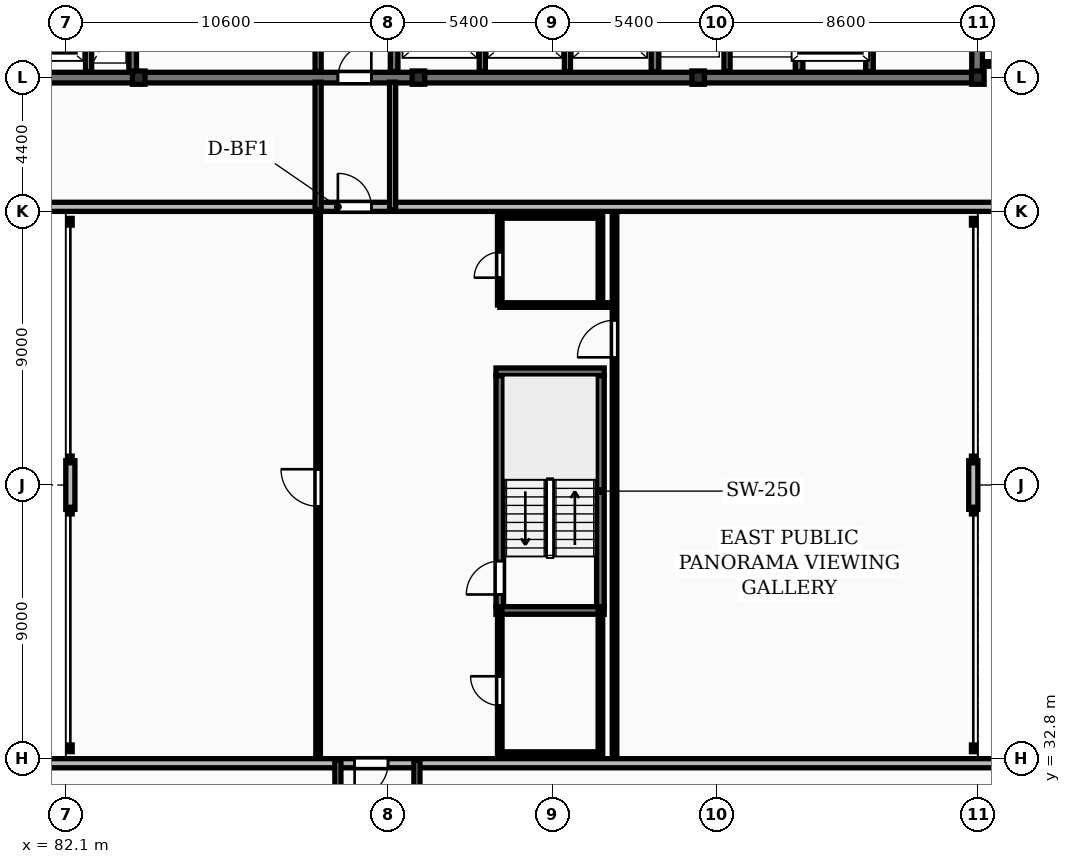
"""IFC4 building model, lengths in metres.
Left out: names, types, materials, properties, quantities, classifications, styles, units other than length and angle.
Written with IfcOpenShell. Run it as: python <this file> out.ifc"""

import sys

from ifc_helpers import new_model, si_unit, direction, frame, frame_2d, origin, origin_2d, place, context, subcontext, project, spatial, rectangle, i_section, extrude, element, fill, save


model = new_model("IFC4")
c1 = context("Model", 3, precision=1e-05, world=origin(), true_north=direction((0.0, 1.0)))
c2 = subcontext(c1, "Body", "Model", "MODEL_VIEW")
j1 = project(units=[si_unit("LENGTHUNIT", "METRE"), si_unit("PLANEANGLEUNIT", "RADIAN")], contexts=[c1])
p1 = place(None, origin())
s1 = spatial("IfcSite", under=j1, at=p1, CompositionType="ELEMENT")
p2 = place(p1, origin())
s2 = spatial("IfcBuilding", under=s1, at=p2, CompositionType="ELEMENT")
p3 = place(p2, frame((0.0, 0.0, 150.1)))
s3 = spatial("IfcBuildingStorey", under=s2, at=p3, CompositionType="ELEMENT", Elevation=150.1)
for number, where, z_axis, x_axis in (
    (1, (84.5, 55.2, 0.0), (0.0, 0.0, 1.0), (1.0, 0.0, 0.0)),
    (2, (93.7, 55.2, 0.0), (0.0, 0.0, 1.0), (1.0, 0.0, 0.0)),
    (3, (102.9, 55.2, 0.0), (0.0, 0.0, 1.0), (1.0, 0.0, 0.0)),
    (4, (112.1, 55.2, 0.0), (0.0, 0.0, 1.0), (1.0, 0.0, 0.0)),
):
    element("IfcColumn", number, at=place(p3, frame(where, z_axis=z_axis, x_axis=x_axis)), inside=s3, PredefinedType="COLUMN", context=c2, shape_type="SweptSolid", body=[
        extrude(i_section(OverallWidth=0.412, OverallDepth=0.437, WebThickness=0.036, FlangeThickness=0.052, FilletRadius=0.015, at=origin_2d()), origin(), (0.0, 0.0, 1.0), 3.6),
    ])
p4 = place(p3, frame((57.6, 50.95, 0.0), z_axis=(0.0, 0.0, 1.0), x_axis=(1.0, 0.0, 0.0)))
e5 = element("IfcWall", 5, at=p4, inside=s3, PredefinedType="STANDARD", context=c2, shape_type="SweptSolid", body=[
    extrude(rectangle(XDim=73.0, YDim=0.3, at=frame_2d((36.5, 0.0))), origin(), (0.0, 0.0, 1.0), 3.31),
])
p5 = place(p4, frame((15.225, 0.0, 0.85)))
e6 = element("IfcOpeningElement", 6, at=p5, cuts=e5, PredefinedType="OPENING", context=c2, shape_type="SweptSolid", body=[
    extrude(rectangle(XDim=1.8, YDim=1.8, at=frame_2d((0.9, 0.9))), frame((0.0, 0.16, 0.0), z_axis=(0.0, -1.0, 0.0), x_axis=(1.0, 0.0, 0.0)), (0.0, 0.0, 1.0), 0.32),
])
p6 = place(p4, frame((58.575, 0.0, 0.85)))
e7 = element("IfcOpeningElement", 7, at=p6, cuts=e5, PredefinedType="OPENING", context=c2, shape_type="SweptSolid", body=[
    extrude(rectangle(XDim=1.8, YDim=1.8, at=frame_2d((0.9, 0.9))), frame((0.0, 0.16, 0.0), z_axis=(0.0, -1.0, 0.0), x_axis=(1.0, 0.0, 0.0)), (0.0, 0.0, 1.0), 0.32),
])
p7 = place(p4, frame((33.45, 0.0, 0.0)))
e8 = element("IfcOpeningElement", 8, at=p7, cuts=e5, PredefinedType="OPENING", context=c2, shape_type="SweptSolid", body=[
    extrude(rectangle(XDim=1.1, YDim=2.1, at=frame_2d((0.55, 1.05))), frame((0.0, 0.16, 0.0), z_axis=(0.0, -1.0, 0.0), x_axis=(1.0, 0.0, 0.0)), (0.0, 0.0, 1.0), 0.32),
])
p8 = place(p3, frame((130.7, 32.65, 0.0), z_axis=(0.0, 0.0, 1.0), x_axis=(-1.0, 0.0, 0.0)))
e9 = element("IfcWall", 9, at=p8, inside=s3, PredefinedType="STANDARD", context=c2, shape_type="SweptSolid", body=[
    extrude(rectangle(XDim=58.0, YDim=0.3, at=frame_2d((29.0, 0.0))), origin(), (0.0, 0.0, 1.0), 3.31),
])
p9 = place(p8, frame((50.125, 0.0, 0.85)))
e10 = element("IfcOpeningElement", 10, at=p9, cuts=e9, PredefinedType="OPENING", context=c2, shape_type="SweptSolid", body=[
    extrude(rectangle(XDim=1.8, YDim=1.8, at=frame_2d((0.9, 0.9))), frame((0.0, 0.16, 0.0), z_axis=(0.0, -1.0, 0.0), x_axis=(1.0, 0.0, 0.0)), (0.0, 0.0, 1.0), 0.32),
])
p10 = place(p8, frame((6.775, 0.0, 0.85)))
e11 = element("IfcOpeningElement", 11, at=p10, cuts=e9, PredefinedType="OPENING", context=c2, shape_type="SweptSolid", body=[
    extrude(rectangle(XDim=1.8, YDim=1.8, at=frame_2d((0.9, 0.9))), frame((0.0, 0.16, 0.0), z_axis=(0.0, -1.0, 0.0), x_axis=(1.0, 0.0, 0.0)), (0.0, 0.0, 1.0), 0.32),
])
p11 = place(p8, frame((38.0, 0.0, 0.0)))
e12 = element("IfcOpeningElement", 12, at=p11, cuts=e9, PredefinedType="OPENING", context=c2, shape_type="SweptSolid", body=[
    extrude(rectangle(XDim=1.1, YDim=2.1, at=frame_2d((0.55, 1.05))), frame((0.0, 0.16, 0.0), z_axis=(0.0, -1.0, 0.0), x_axis=(1.0, 0.0, 0.0)), (0.0, 0.0, 1.0), 0.32),
])
for number, where, z_axis, x_axis in (
    (13, (82.25, 41.0, 0.0), (0.0, 0.0, 1.0), (0.0, 1.0, 0.0)),
    (14, (111.95, 41.0, 0.0), (0.0, 0.0, 1.0), (0.0, 1.0, 0.0)),
):
    element("IfcWall", number, at=place(p3, frame(where, z_axis=z_axis, x_axis=x_axis)), inside=s3, PredefinedType="STANDARD", context=c2, shape_type="SweptSolid", body=[
        extrude(rectangle(XDim=1.6, YDim=0.3, at=frame_2d((0.8, 0.0))), origin(), (0.0, 0.0, 1.0), 2.38),
    ])
p12 = place(p3, frame((75.95, 55.2, 0.0), z_axis=(0.0, 0.0, 1.0), x_axis=(1.0, 0.0, 0.0)))
e15 = element("IfcWall", 15, at=p12, inside=s3, PredefinedType="SHEAR", context=c2, shape_type="SweptSolid", body=[
    extrude(rectangle(XDim=36.3, YDim=0.35, at=frame_2d((18.15, 0.0))), origin(), (0.0, 0.0, 1.0), 3.6),
])
p13 = place(p12, frame((15.1, 0.0, 0.0)))
e16 = element("IfcOpeningElement", 16, at=p13, cuts=e15, PredefinedType="OPENING", context=c2, shape_type="SweptSolid", body=[
    extrude(rectangle(XDim=1.1, YDim=2.1, at=frame_2d((0.55, 1.05))), frame((0.0, 0.185, 0.0), z_axis=(0.0, -1.0, 0.0), x_axis=(1.0, 0.0, 0.0)), (0.0, 0.0, 1.0), 0.37),
])
p14 = place(p3, frame((112.075, 55.375, 0.0), z_axis=(0.0, 0.0, 1.0), x_axis=(0.0, 1.0, 0.0)))
e17 = element("IfcWall", 17, at=p14, inside=s3, PredefinedType="SHEAR", context=c2, shape_type="SweptSolid", body=[
    extrude(rectangle(XDim=11.65, YDim=0.35, at=frame_2d((5.825, 0.0))), origin(), (0.0, 0.0, 1.0), 3.6),
])
p15 = place(p3, frame((82.85, 55.4, 0.0), z_axis=(0.0, 0.0, 1.0), x_axis=(0.0, 1.0, 0.0)))
e18 = element("IfcWall", 18, at=p15, inside=s3, PredefinedType="PARTITIONING", context=c2, shape_type="SweptSolid", body=[
    extrude(rectangle(XDim=2.56, YDim=0.2, at=frame_2d((1.28, 0.0))), origin(), (0.0, 0.0, 1.0), 3.31),
])
p16 = place(p3, frame((84.3, 55.4, 0.0), z_axis=(0.0, 0.0, 1.0), x_axis=(0.0, 1.0, 0.0)))
e19 = element("IfcWall", 19, at=p16, inside=s3, PredefinedType="SHEAR", context=c2, shape_type="SweptSolid", body=[
    extrude(rectangle(XDim=11.6, YDim=0.25, at=frame_2d((5.8, 0.0))), origin(), (0.0, 0.0, 1.0), 3.6),
])
p17 = place(p16, frame((5.2, 0.0, 0.0)))
e20 = element("IfcOpeningElement", 20, at=p17, cuts=e19, PredefinedType="OPENING", context=c2, shape_type="SweptSolid", body=[
    extrude(rectangle(XDim=1.1, YDim=2.1, at=frame_2d((0.55, 1.05))), frame((0.0, 0.135, 0.0), z_axis=(0.0, -1.0, 0.0), x_axis=(1.0, 0.0, 0.0)), (0.0, 0.0, 1.0), 0.27),
])
p18 = place(p3, frame((90.4, 55.4, 0.0), z_axis=(0.0, 0.0, 1.0), x_axis=(0.0, 1.0, 0.0)))
e21 = element("IfcWall", 21, at=p18, inside=s3, PredefinedType="PARTITIONING", context=c2, shape_type="SweptSolid", body=[
    extrude(rectangle(XDim=4.1, YDim=0.2, at=frame_2d((2.05, 0.0))), origin(), (0.0, 0.0, 1.0), 3.31),
])
p19 = place(p3, frame((92.9, 55.4, 0.0), z_axis=(0.0, 0.0, 1.0), x_axis=(0.0, 1.0, 0.0)))
e22 = element("IfcWall", 22, at=p19, inside=s3, PredefinedType="SHEAR", context=c2, shape_type="SweptSolid", body=[
    extrude(rectangle(XDim=4.1, YDim=0.25, at=frame_2d((2.05, 0.0))), origin(), (0.0, 0.0, 1.0), 3.6),
])
for number, where, z_axis, x_axis in (
    (23, (95.8, 55.4, 0.0), (0.0, 0.0, 1.0), (0.0, 1.0, 0.0)),
    (24, (98.6, 55.4, 0.0), (0.0, 0.0, 1.0), (0.0, 1.0, 0.0)),
):
    element("IfcWall", number, at=place(p3, frame(where, z_axis=z_axis, x_axis=x_axis)), inside=s3, PredefinedType="PARTITIONING", context=c2, shape_type="SweptSolid", body=[
        extrude(rectangle(XDim=2.72, YDim=0.2, at=frame_2d((1.36, 0.0))), origin(), (0.0, 0.0, 1.0), 3.31),
    ])
p20 = place(p3, frame((101.48, 55.4, 0.0), z_axis=(0.0, 0.0, 1.0), x_axis=(0.0, 1.0, 0.0)))
e25 = element("IfcWall", 25, at=p20, inside=s3, PredefinedType="SHEAR", context=c2, shape_type="SweptSolid", body=[
    extrude(rectangle(XDim=2.85, YDim=0.25, at=frame_2d((1.425, 0.0))), origin(), (0.0, 0.0, 1.0), 3.6),
])
p21 = place(p3, frame((103.85, 55.4, 0.0), z_axis=(0.0, 0.0, 1.0), x_axis=(0.0, 1.0, 0.0)))
e26 = element("IfcWall", 26, at=p21, inside=s3, PredefinedType="PARTITIONING", context=c2, shape_type="SweptSolid", body=[
    extrude(rectangle(XDim=2.72, YDim=0.2, at=frame_2d((1.36, 0.0))), origin(), (0.0, 0.0, 1.0), 3.31),
])
p22 = place(p3, frame((106.22, 55.4, 0.0), z_axis=(0.0, 0.0, 1.0), x_axis=(0.0, 1.0, 0.0)))
e27 = element("IfcWall", 27, at=p22, inside=s3, PredefinedType="SHEAR", context=c2, shape_type="SweptSolid", body=[
    extrude(rectangle(XDim=2.85, YDim=0.25, at=frame_2d((1.425, 0.0))), origin(), (0.0, 0.0, 1.0), 3.6),
])
p23 = place(p3, frame((108.535, 55.4, 0.0), z_axis=(0.0, 0.0, 1.0), x_axis=(0.0, 1.0, 0.0)))
e28 = element("IfcWall", 28, at=p23, inside=s3, PredefinedType="SHEAR", context=c2, shape_type="SweptSolid", body=[
    extrude(rectangle(XDim=11.6, YDim=0.25, at=frame_2d((5.8, 0.0))), origin(), (0.0, 0.0, 1.0), 3.6),
])
p24 = place(p23, frame((8.2, 0.0, 0.0)))
e29 = element("IfcOpeningElement", 29, at=p24, cuts=e28, PredefinedType="OPENING", context=c2, shape_type="SweptSolid", body=[
    extrude(rectangle(XDim=1.1, YDim=2.1, at=frame_2d((0.55, 1.05))), frame((0.0, 0.135, 0.0), z_axis=(0.0, -1.0, 0.0), x_axis=(1.0, 0.0, 0.0)), (0.0, 0.0, 1.0), 0.27),
])
p25 = place(p23, frame((10.25, 0.0, 0.0)))
e30 = element("IfcOpeningElement", 30, at=p25, cuts=e28, PredefinedType="OPENING", context=c2, shape_type="SweptSolid", body=[
    extrude(rectangle(XDim=0.85, YDim=2.05, at=frame_2d((0.425, 1.025))), frame((0.0, 0.135, 0.0), z_axis=(0.0, -1.0, 0.0), x_axis=(1.0, 0.0, 0.0)), (0.0, 0.0, 1.0), 0.27),
])
p26 = place(p3, frame((112.27, 55.65, 0.0), z_axis=(0.0, 0.0, 1.0), x_axis=(1.0, 0.0, 0.0)))
e31 = element("IfcWall", 31, at=p26, inside=s3, PredefinedType="PARTITIONING", context=c2, shape_type="SweptSolid", body=[
    extrude(rectangle(XDim=6.76, YDim=0.15, at=frame_2d((3.38, 0.0))), origin(), (0.0, 0.0, 1.0), 3.31),
])
p27 = place(p26, frame((1.64, 0.0, 0.0)))
e32 = element("IfcOpeningElement", 32, at=p27, cuts=e31, PredefinedType="OPENING", context=c2, shape_type="SweptSolid", body=[
    extrude(rectangle(XDim=0.84, YDim=2.04, at=frame_2d((0.42, 1.02))), frame((0.0, 0.085, 0.0), z_axis=(0.0, -1.0, 0.0), x_axis=(1.0, 0.0, 0.0)), (0.0, 0.0, 1.0), 0.17),
])
p28 = place(p26, frame((3.16, 0.0, 0.0)))
e33 = element("IfcOpeningElement", 33, at=p28, cuts=e31, PredefinedType="OPENING", context=c2, shape_type="SweptSolid", body=[
    extrude(rectangle(XDim=0.88, YDim=2.06, at=frame_2d((0.44, 1.03))), frame((0.0, 0.085, 0.0), z_axis=(0.0, -1.0, 0.0), x_axis=(1.0, 0.0, 0.0)), (0.0, 0.0, 1.0), 0.17),
])
for number, where, z_axis, x_axis in (
    (34, (90.4, 50.85, 0.0), (0.0, 0.0, 1.0), (0.0, 1.0, 0.0)),
    (35, (92.85, 50.85, 0.0), (0.0, 0.0, 1.0), (0.0, 1.0, 0.0)),
):
    element("IfcWall", number, at=place(p3, frame(where, z_axis=z_axis, x_axis=x_axis)), inside=s3, PredefinedType="PARTITIONING", context=c2, shape_type="SweptSolid", body=[
        extrude(rectangle(XDim=4.2, YDim=0.2, at=frame_2d((2.1, 0.0))), origin(), (0.0, 0.0, 1.0), 3.31),
    ])
p29 = place(p3, frame((91.05, 30.55, 0.0), z_axis=(0.0, 0.0, 1.0), x_axis=(0.0, 1.0, 0.0)))
e36 = element("IfcWall", 36, at=p29, inside=s3, PredefinedType="PARTITIONING", context=c2, shape_type="SweptSolid", body=[
    extrude(rectangle(XDim=2.2, YDim=0.2, at=frame_2d((1.1, 0.0))), origin(), (0.0, 0.0, 1.0), 3.31),
])
p30 = place(p3, frame((93.65, 30.55, 0.0), z_axis=(0.0, 0.0, 1.0), x_axis=(0.0, 1.0, 0.0)))
e37 = element("IfcWall", 37, at=p30, inside=s3, PredefinedType="PARTITIONING", context=c2, shape_type="SweptSolid", body=[
    extrude(rectangle(XDim=2.2, YDim=0.2, at=frame_2d((1.1, 0.0))), origin(), (0.0, 0.0, 1.0), 2.389),
])
p31 = place(p3, frame((96.375, 37.8, 0.0), z_axis=(0.0, 0.0, 1.0), x_axis=(0.0, 1.0, 0.0)))
e38 = element("IfcWall", 38, at=p31, inside=s3, PredefinedType="SHEAR", context=c2, shape_type="SweptSolid", body=[
    extrude(rectangle(XDim=7.6, YDim=0.25, at=frame_2d((3.8, 0.0))), origin(), (0.0, 0.0, 1.0), 3.6),
])
p32 = place(p31, frame((0.4, 0.0, 0.0)))
e39 = element("IfcOpeningElement", 39, at=p32, cuts=e38, PredefinedType="OPENING", context=c2, shape_type="SweptSolid", body=[
    extrude(rectangle(XDim=1.1, YDim=2.1, at=frame_2d((0.55, 1.05))), frame((0.0, 0.135, 0.0), z_axis=(0.0, -1.0, 0.0), x_axis=(1.0, 0.0, 0.0)), (0.0, 0.0, 1.0), 0.27),
])
p33 = place(p3, frame((99.685, 37.8, 0.0), z_axis=(0.0, 0.0, 1.0), x_axis=(0.0, 1.0, 0.0)))
e40 = element("IfcWall", 40, at=p33, inside=s3, PredefinedType="SHEAR", context=c2, shape_type="SweptSolid", body=[
    extrude(rectangle(XDim=7.6, YDim=0.25, at=frame_2d((3.8, 0.0))), origin(), (0.0, 0.0, 1.0), 3.6),
])
for number, where, z_axis, x_axis in (
    (41, (96.25, 37.675, 0.0), (0.0, 0.0, 1.0), (1.0, 0.0, 0.0)),
    (42, (96.25, 45.525, 0.0), (0.0, 0.0, 1.0), (1.0, 0.0, 0.0)),
):
    element("IfcWall", number, at=place(p3, frame(where, z_axis=z_axis, x_axis=x_axis)), inside=s3, PredefinedType="SHEAR", context=c2, shape_type="SweptSolid", body=[
        extrude(rectangle(XDim=3.56, YDim=0.25, at=frame_2d((1.78, 0.0))), origin(), (0.0, 0.0, 1.0), 3.6),
    ])
for number, where, z_axis, x_axis in (
    (43, (96.375, 32.95, 0.0), (0.0, 0.0, 1.0), (1.0, 0.0, 0.0)),
    (44, (96.375, 50.65, 0.0), (0.0, 0.0, 1.0), (1.0, 0.0, 0.0)),
):
    element("IfcWall", number, at=place(p3, frame(where, z_axis=z_axis, x_axis=x_axis)), inside=s3, PredefinedType="PARTITIONING", context=c2, shape_type="SweptSolid", body=[
        extrude(rectangle(XDim=3.31, YDim=0.15, at=frame_2d((1.655, 0.0))), origin(), (0.0, 0.0, 1.0), 2.69),
    ])
p34 = place(p3, frame((96.375, 32.95, 0.0), z_axis=(0.0, 0.0, 1.0), x_axis=(0.0, 1.0, 0.0)))
e45 = element("IfcWall", 45, at=p34, inside=s3, PredefinedType="PARTITIONING", context=c2, shape_type="SweptSolid", body=[
    extrude(rectangle(XDim=4.725, YDim=0.15, at=frame_2d((2.363, 0.0))), origin(), (0.0, 0.0, 1.0), 2.389),
])
p35 = place(p34, frame((1.6, 0.0, 0.0)))
e46 = element("IfcOpeningElement", 46, at=p35, cuts=e45, PredefinedType="OPENING", context=c2, shape_type="SweptSolid", body=[
    extrude(rectangle(XDim=0.96, YDim=2.1, at=frame_2d((0.48, 1.05))), frame((0.0, 0.085, 0.0), z_axis=(0.0, -1.0, 0.0), x_axis=(1.0, 0.0, 0.0)), (0.0, 0.0, 1.0), 0.17),
])
p36 = place(p3, frame((96.375, 47.72, 0.0), z_axis=(0.0, 0.0, 1.0), x_axis=(0.0, 1.0, 0.0)))
e47 = element("IfcWall", 47, at=p36, inside=s3, PredefinedType="PARTITIONING", context=c2, shape_type="SweptSolid", body=[
    extrude(rectangle(XDim=2.93, YDim=0.15, at=frame_2d((1.465, 0.0))), origin(), (0.0, 0.0, 1.0), 2.389),
])
p37 = place(p36, frame((0.9, 0.0, 0.0)))
e48 = element("IfcOpeningElement", 48, at=p37, cuts=e47, PredefinedType="OPENING", context=c2, shape_type="SweptSolid", body=[
    extrude(rectangle(XDim=0.84, YDim=2.04, at=frame_2d((0.42, 1.02))), frame((0.0, 0.085, 0.0), z_axis=(0.0, -1.0, 0.0), x_axis=(1.0, 0.0, 0.0)), (0.0, 0.0, 1.0), 0.17),
])
p38 = place(p3, frame((96.375, 47.72, 0.0), z_axis=(0.0, 0.0, 1.0), x_axis=(1.0, 0.0, 0.0)))
e49 = element("IfcWall", 49, at=p38, inside=s3, PredefinedType="PARTITIONING", context=c2, shape_type="SweptSolid", body=[
    extrude(rectangle(XDim=3.775, YDim=0.15, at=frame_2d((1.887, 0.0))), origin(), (0.0, 0.0, 1.0), 3.31),
])
p39 = place(p3, frame((99.685, 32.95, 0.0), z_axis=(0.0, 0.0, 1.0), x_axis=(0.0, 1.0, 0.0)))
e50 = element("IfcWall", 50, at=p39, inside=s3, PredefinedType="PARTITIONING", context=c2, shape_type="SweptSolid", body=[
    extrude(rectangle(XDim=4.725, YDim=0.15, at=frame_2d((2.363, 0.0))), origin(), (0.0, 0.0, 1.0), 2.389),
])
p40 = place(p3, frame((99.685, 47.72, 0.0), z_axis=(0.0, 0.0, 1.0), x_axis=(0.0, 1.0, 0.0)))
e51 = element("IfcWall", 51, at=p40, inside=s3, PredefinedType="PARTITIONING", context=c2, shape_type="SweptSolid", body=[
    extrude(rectangle(XDim=2.93, YDim=0.15, at=frame_2d((1.465, 0.0))), origin(), (0.0, 0.0, 1.0), 2.389),
])
p41 = place(p3, frame((90.4, 32.9, 0.0), z_axis=(0.0, 0.0, 1.0), x_axis=(0.0, 1.0, 0.0)))
e52 = element("IfcWall", 52, at=p41, inside=s3, PredefinedType="PARTITIONING", context=c2, shape_type="SweptSolid", body=[
    extrude(rectangle(XDim=17.8, YDim=0.15, at=frame_2d((8.9, 0.0))), origin(), (0.0, 0.0, 1.0), 3.31),
])
p42 = place(p41, frame((8.2, 0.0, 0.0)))
e53 = element("IfcOpeningElement", 53, at=p42, cuts=e52, PredefinedType="OPENING", context=c2, shape_type="SweptSolid", body=[
    extrude(rectangle(XDim=1.22, YDim=2.18, at=frame_2d((0.61, 1.09))), frame((0.0, 0.085, 0.0), z_axis=(0.0, -1.0, 0.0), x_axis=(1.0, 0.0, 0.0)), (0.0, 0.0, 1.0), 0.17),
])
p43 = place(p3, frame((100.15, 32.9, 0.0), z_axis=(0.0, 0.0, 1.0), x_axis=(0.0, 1.0, 0.0)))
e54 = element("IfcWall", 54, at=p43, inside=s3, PredefinedType="PARTITIONING", context=c2, shape_type="SweptSolid", body=[
    extrude(rectangle(XDim=17.8, YDim=0.15, at=frame_2d((8.9, 0.0))), origin(), (0.0, 0.0, 1.0), 3.31),
])
p44 = place(p43, frame((13.1, 0.0, 0.0)))
e55 = element("IfcOpeningElement", 55, at=p44, cuts=e54, PredefinedType="OPENING", context=c2, shape_type="SweptSolid", body=[
    extrude(rectangle(XDim=1.22, YDim=2.18, at=frame_2d((0.61, 1.09))), frame((0.0, 0.085, 0.0), z_axis=(0.0, -1.0, 0.0), x_axis=(1.0, 0.0, 0.0)), (0.0, 0.0, 1.0), 0.17),
])
p45 = place(p7, origin())
e56 = element("IfcDoor", 56, at=p45, inside=s3, OperationType="SINGLE_SWING_LEFT", PredefinedType="DOOR", context=c2, shape_type="SweptSolid", body=[
    extrude(rectangle(XDim=1.1, YDim=2.1, at=frame_2d((0.55, 1.05))), frame((0.0, 0.025, 0.0), z_axis=(0.0, -1.0, 0.0), x_axis=(1.0, 0.0, 0.0)), (0.0, 0.0, 1.0), 0.05),
])
fill(e8, e56)
p46 = place(p11, origin())
e57 = element("IfcDoor", 57, at=p46, inside=s3, OperationType="SINGLE_SWING_RIGHT", PredefinedType="DOOR", context=c2, shape_type="SweptSolid", body=[
    extrude(rectangle(XDim=1.1, YDim=2.1, at=frame_2d((0.55, 1.05))), frame((0.0, 0.025, 0.0), z_axis=(0.0, -1.0, 0.0), x_axis=(1.0, 0.0, 0.0)), (0.0, 0.0, 1.0), 0.05),
])
fill(e12, e57)
p47 = place(p13, origin())
e58 = element("IfcDoor", 58, at=p47, inside=s3, OperationType="SINGLE_SWING_RIGHT", PredefinedType="DOOR", context=c2, shape_type="SweptSolid", body=[
    extrude(rectangle(XDim=1.1, YDim=2.1, at=frame_2d((0.55, 1.05))), frame((0.0, 0.025, 0.0), z_axis=(0.0, -1.0, 0.0), x_axis=(1.0, 0.0, 0.0)), (0.0, 0.0, 1.0), 0.05),
])
fill(e16, e58)
p48 = place(p32, origin())
e59 = element("IfcDoor", 59, at=p48, inside=s3, OperationType="SINGLE_SWING_LEFT", PredefinedType="DOOR", context=c2, shape_type="SweptSolid", body=[
    extrude(rectangle(XDim=1.1, YDim=2.1, at=frame_2d((0.55, 1.05))), frame((0.0, 0.025, 0.0), z_axis=(0.0, -1.0, 0.0), x_axis=(1.0, 0.0, 0.0)), (0.0, 0.0, 1.0), 0.05),
])
fill(e39, e59)
p49 = place(p35, origin())
e60 = element("IfcDoor", 60, at=p49, inside=s3, OperationType="SINGLE_SWING_RIGHT", PredefinedType="DOOR", context=c2, shape_type="SweptSolid", body=[
    extrude(rectangle(XDim=0.96, YDim=2.1, at=frame_2d((0.48, 1.05))), frame((0.0, 0.025, 0.0), z_axis=(0.0, -1.0, 0.0), x_axis=(1.0, 0.0, 0.0)), (0.0, 0.0, 1.0), 0.05),
])
fill(e46, e60)
p50 = place(p37, origin())
e61 = element("IfcDoor", 61, at=p50, inside=s3, OperationType="SINGLE_SWING_LEFT", PredefinedType="DOOR", context=c2, shape_type="SweptSolid", body=[
    extrude(rectangle(XDim=0.84, YDim=2.04, at=frame_2d((0.42, 1.02))), frame((0.0, 0.025, 0.0), z_axis=(0.0, -1.0, 0.0), x_axis=(1.0, 0.0, 0.0)), (0.0, 0.0, 1.0), 0.05),
])
fill(e48, e61)
p51 = place(p42, origin())
e62 = element("IfcDoor", 62, at=p51, inside=s3, OperationType="SINGLE_SWING_RIGHT", PredefinedType="DOOR", context=c2, shape_type="SweptSolid", body=[
    extrude(rectangle(XDim=1.22, YDim=2.18, at=frame_2d((0.61, 1.09))), frame((0.0, 0.025, 0.0), z_axis=(0.0, -1.0, 0.0), x_axis=(1.0, 0.0, 0.0)), (0.0, 0.0, 1.0), 0.05),
])
fill(e53, e62)
p52 = place(p44, origin())
e63 = element("IfcDoor", 63, at=p52, inside=s3, OperationType="SINGLE_SWING_LEFT", PredefinedType="DOOR", context=c2, shape_type="SweptSolid", body=[
    extrude(rectangle(XDim=1.22, YDim=2.18, at=frame_2d((0.61, 1.09))), frame((0.0, 0.025, 0.0), z_axis=(0.0, -1.0, 0.0), x_axis=(1.0, 0.0, 0.0)), (0.0, 0.0, 1.0), 0.05),
])
fill(e55, e63)
save(model, sys.argv[1])
